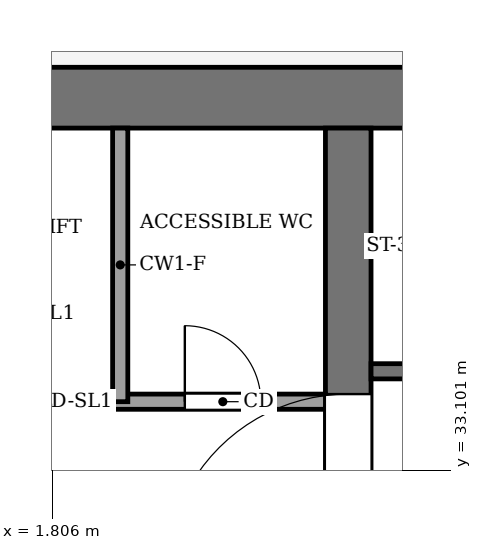
"""IFC4 building model, lengths in metres.
Left out: names, types, materials, properties, quantities, classifications, styles, units other than length and angle.
Written with IfcOpenShell. Run it as: python <this file> out.ifc"""

import sys

from ifc_helpers import new_model, si_unit, direction, frame, frame_2d, origin, place, context, subcontext, project, spatial, rectangle, extrude, element, fill, save


model = new_model("IFC4")
c1 = context("Model", 3, precision=1e-05, world=origin(), true_north=direction((0.0, 1.0)))
c2 = subcontext(c1, "Body", "Model", "MODEL_VIEW")
j1 = project(units=[si_unit("LENGTHUNIT", "METRE"), si_unit("PLANEANGLEUNIT", "RADIAN")], contexts=[c1])
p1 = place(None, origin())
s1 = spatial("IfcSite", under=j1, at=p1, CompositionType="ELEMENT")
p2 = place(p1, origin())
s2 = spatial("IfcBuilding", under=s1, at=p2, CompositionType="ELEMENT")
p3 = place(p2, frame((0.0, 0.0, 238.0)))
s3 = spatial("IfcBuildingStorey", under=s2, at=p3, CompositionType="ELEMENT", Elevation=238.0)
p4 = place(p3, frame((-13.4, 38.0, -0.13), z_axis=(0.0, 0.0, 1.0), x_axis=(1.0, 0.0, 0.0)))
e1 = element("IfcWall", 1, at=p4, inside=s3, PredefinedType="SHEAR", context=c2, shape_type="SweptSolid", body=[
    extrude(rectangle(XDim=26.8, YDim=0.8, at=frame_2d((13.4, 0.0))), origin(), (0.0, 0.0, 1.0), 4.0),
])
p5 = place(p3, frame((5.7, 18.4, -0.13), z_axis=(0.0, 0.0, 1.0), x_axis=(0.0, 1.0, 0.0)))
e2 = element("IfcWall", 2, at=p5, inside=s3, PredefinedType="SHEAR", context=c2, shape_type="SweptSolid", body=[
    extrude(rectangle(XDim=19.2, YDim=0.6, at=frame_2d((9.6, 0.0))), origin(), (0.0, 0.0, 1.0), 4.0),
])
p6 = place(p5, frame((13.3, 0.0, 0.13)))
e3 = element("IfcOpeningElement", 3, at=p6, cuts=e2, PredefinedType="OPENING", context=c2, shape_type="SweptSolid", body=[
    extrude(rectangle(XDim=2.4, YDim=2.4, at=frame_2d((1.2, 1.2))), frame((0.0, 0.31, 0.0), z_axis=(0.0, -1.0, 0.0), x_axis=(1.0, 0.0, 0.0)), (0.0, 0.0, 1.0), 0.62),
])
p7 = place(p3, frame((-5.4, 34.0, 0.0), z_axis=(0.0, 0.0, 1.0), x_axis=(1.0, 0.0, 0.0)))
e4 = element("IfcWall", 4, at=p7, inside=s3, PredefinedType="PARTITIONING", context=c2, shape_type="SweptSolid", body=[
    extrude(rectangle(XDim=10.8, YDim=0.2, at=frame_2d((5.4, 0.0))), origin(), (0.0, 0.0, 1.0), 3.87),
])
p8 = place(p7, frame((6.15, 0.0, 0.0)))
e5 = element("IfcOpeningElement", 5, at=p8, cuts=e4, PredefinedType="OPENING", context=c2, shape_type="SweptSolid", body=[
    extrude(rectangle(XDim=1.2, YDim=2.2, at=frame_2d((0.6, 1.1))), frame((0.0, 0.11, 0.0), z_axis=(0.0, -1.0, 0.0), x_axis=(1.0, 0.0, 0.0)), (0.0, 0.0, 1.0), 0.22),
])
p9 = place(p7, frame((8.95, 0.0, 0.0)))
e6 = element("IfcOpeningElement", 6, at=p9, cuts=e4, PredefinedType="OPENING", context=c2, shape_type="SweptSolid", body=[
    extrude(rectangle(XDim=1.0, YDim=2.1, at=frame_2d((0.5, 1.05))), frame((0.0, 0.11, 0.0), z_axis=(0.0, -1.0, 0.0), x_axis=(1.0, 0.0, 0.0)), (0.0, 0.0, 1.0), 0.22),
])
p10 = place(p3, frame((6.0, 34.4, 0.0), z_axis=(0.0, 0.0, 1.0), x_axis=(1.0, 0.0, 0.0)))
e7 = element("IfcWall", 7, at=p10, inside=s3, PredefinedType="PARTITIONING", context=c2, shape_type="SweptSolid", body=[
    extrude(rectangle(XDim=6.6, YDim=0.2, at=frame_2d((3.3, 0.0))), origin(), (0.0, 0.0, 1.0), 3.87),
])
p11 = place(p10, frame((4.8, 0.0, 0.0)))
e8 = element("IfcOpeningElement", 8, at=p11, cuts=e7, PredefinedType="OPENING", context=c2, shape_type="SweptSolid", body=[
    extrude(rectangle(XDim=1.2, YDim=2.2, at=frame_2d((0.6, 1.1))), frame((0.0, 0.11, 0.0), z_axis=(0.0, -1.0, 0.0), x_axis=(1.0, 0.0, 0.0)), (0.0, 0.0, 1.0), 0.22),
])
p12 = place(p3, frame((2.7, 34.0, 0.0), z_axis=(0.0, 0.0, 1.0), x_axis=(0.0, 1.0, 0.0)))
e9 = element("IfcWall", 9, at=p12, inside=s3, PredefinedType="PARTITIONING", context=c2, shape_type="SweptSolid", body=[
    extrude(rectangle(XDim=3.6, YDim=0.2, at=frame_2d((1.8, 0.0))), origin(), (0.0, 0.0, 1.0), 3.87),
])
p13 = place(p8, origin())
e10 = element("IfcDoor", 10, at=p13, inside=s3, OperationType="SLIDING_TO_LEFT", PredefinedType="DOOR", context=c2, shape_type="SweptSolid", body=[
    extrude(rectangle(XDim=1.2, YDim=2.2, at=frame_2d((0.6, 1.1))), frame((0.0, 0.025, 0.0), z_axis=(0.0, -1.0, 0.0), x_axis=(1.0, 0.0, 0.0)), (0.0, 0.0, 1.0), 0.05),
])
fill(e5, e10)
p14 = place(p9, origin())
e11 = element("IfcDoor", 11, at=p14, inside=s3, OperationType="SINGLE_SWING_LEFT", PredefinedType="DOOR", context=c2, shape_type="SweptSolid", body=[
    extrude(rectangle(XDim=1.0, YDim=2.1, at=frame_2d((0.5, 1.05))), frame((0.0, 0.025, 0.0), z_axis=(0.0, -1.0, 0.0), x_axis=(1.0, 0.0, 0.0)), (0.0, 0.0, 1.0), 0.05),
])
fill(e6, e11)
p15 = place(p6, origin())
e12 = element("IfcDoor", 12, at=p15, inside=s3, OperationType="DOUBLE_DOOR_SINGLE_SWING", PredefinedType="DOOR", context=c2, shape_type="SweptSolid", body=[
    extrude(rectangle(XDim=2.4, YDim=2.4, at=frame_2d((1.2, 1.2))), frame((0.0, 0.025, 0.0), z_axis=(0.0, -1.0, 0.0), x_axis=(1.0, 0.0, 0.0)), (0.0, 0.0, 1.0), 0.05),
])
fill(e3, e12)
save(model, sys.argv[1])
